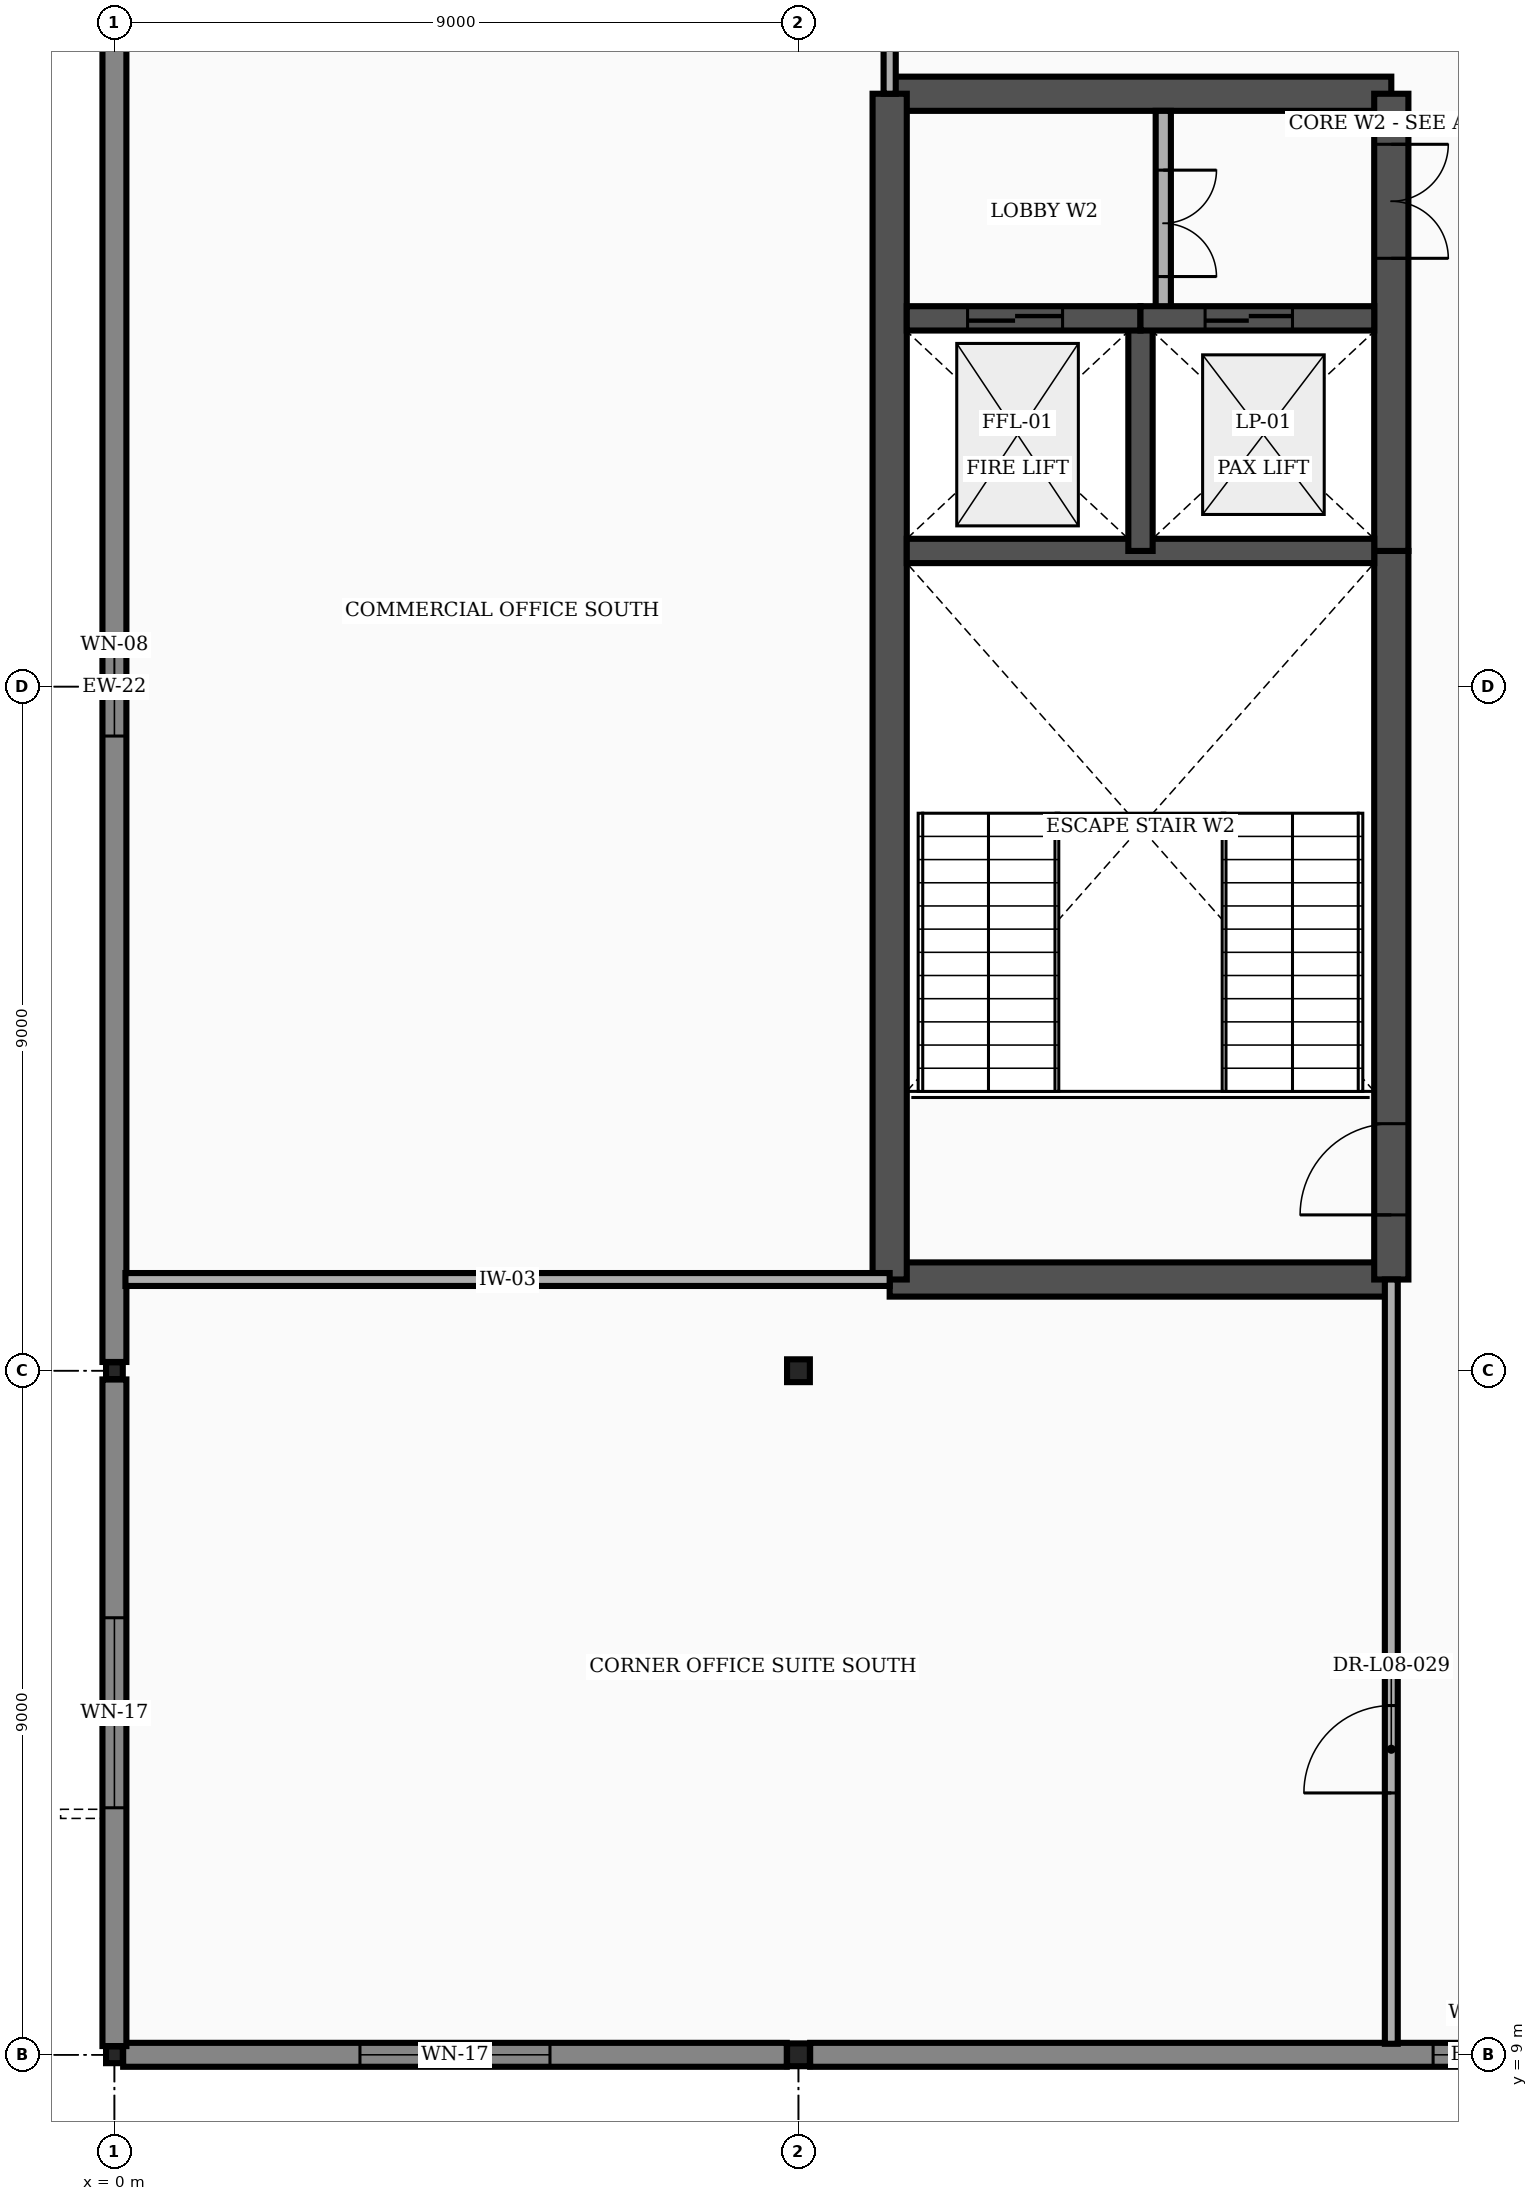
"""IFC4 building model, lengths in metres.
Left out: names, types, materials, properties, quantities, classifications, styles, units other than length and angle.
Written with IfcOpenShell. Run it as: python <this file> out.ifc"""

import sys

from ifc_helpers import new_model, si_unit, direction, frame, frame_2d, origin, origin_2d, place, context, subcontext, project, spatial, rectangle, hollow_rectangle, extrude, element, fill, save


model = new_model("IFC4")
c1 = context("Model", 3, precision=1e-05, world=origin(), true_north=direction((0.0, 1.0)))
c2 = subcontext(c1, "Body", "Model", "MODEL_VIEW")
j1 = project(units=[si_unit("LENGTHUNIT", "METRE"), si_unit("PLANEANGLEUNIT", "RADIAN")], contexts=[c1])
p1 = place(None, origin())
s1 = spatial("IfcSite", under=j1, at=p1, CompositionType="ELEMENT")
p2 = place(p1, origin())
s2 = spatial("IfcBuilding", under=s1, at=p2, CompositionType="ELEMENT")
p3 = place(p2, frame((0.0, 0.0, 37.8)))
s3 = spatial("IfcBuildingStorey", under=s2, at=p3, CompositionType="ELEMENT", Elevation=37.8)
for number, where, z_axis, x_axis in (
    (1, (0.0, 9.0, 0.0), (0.0, 0.0, 1.0), (1.0, 0.0, 0.0)),
    (2, (0.0, 18.0, 0.0), (0.0, 0.0, 1.0), (1.0, 0.0, 0.0)),
):
    element("IfcColumn", number, at=place(p3, frame(where, z_axis=z_axis, x_axis=x_axis)), inside=s3, PredefinedType="COLUMN", context=c2, shape_type="SweptSolid", body=[
        extrude(hollow_rectangle(XDim=0.22, YDim=0.22, WallThickness=0.01, at=origin_2d()), origin(), (0.0, 0.0, 1.0), 3.9),
    ])
for number, where, z_axis, x_axis in (
    (3, (9.0, 9.0, 0.0), (0.0, 0.0, 1.0), (1.0, 0.0, 0.0)),
    (4, (9.0, 18.0, 0.0), (0.0, 0.0, 1.0), (1.0, 0.0, 0.0)),
):
    element("IfcColumn", number, at=place(p3, frame(where, z_axis=z_axis, x_axis=x_axis)), inside=s3, PredefinedType="COLUMN", context=c2, shape_type="SweptSolid", body=[
        extrude(hollow_rectangle(XDim=0.3, YDim=0.3, WallThickness=0.012, at=origin_2d()), origin(), (0.0, 0.0, 1.0), 3.9),
    ])
p4 = place(p3, frame((0.115, 9.0, 0.0), z_axis=(0.0, 0.0, 1.0), x_axis=(1.0, 0.0, 0.0)))
e5 = element("IfcWall", 5, at=p4, inside=s3, PredefinedType="STANDARD", context=c2, shape_type="SweptSolid", body=[
    extrude(rectangle(XDim=8.731, YDim=0.315, at=frame_2d((4.366, 0.0))), origin(), (0.0, 0.0, 1.0), 3.565),
])
p5 = place(p4, frame((3.115, 0.0, 0.7)))
e6 = element("IfcOpeningElement", 6, at=p5, cuts=e5, PredefinedType="OPENING", context=c2, shape_type="SweptSolid", body=[
    extrude(rectangle(XDim=2.5, YDim=1.9, at=frame_2d((1.25, 0.95))), frame((0.0, 0.169, 0.0), z_axis=(0.0, -1.0, 0.0), x_axis=(1.0, 0.0, 0.0)), (0.0, 0.0, 1.0), 0.339),
])
p6 = place(p3, frame((9.154, 9.0, 0.0), z_axis=(0.0, 0.0, 1.0), x_axis=(1.0, 0.0, 0.0)))
e7 = element("IfcWall", 7, at=p6, inside=s3, PredefinedType="STANDARD", context=c2, shape_type="SweptSolid", body=[
    extrude(rectangle(XDim=17.692, YDim=0.315, at=frame_2d((8.846, 0.0))), origin(), (0.0, 0.0, 1.0), 2.803),
])
p7 = place(p6, frame((8.196, 0.0, 0.7)))
e8 = element("IfcOpeningElement", 8, at=p7, cuts=e7, PredefinedType="OPENING", context=c2, shape_type="SweptSolid", body=[
    extrude(rectangle(XDim=1.3, YDim=1.9, at=frame_2d((0.65, 0.95))), frame((0.0, 0.169, 0.0), z_axis=(0.0, -1.0, 0.0), x_axis=(1.0, 0.0, 0.0)), (0.0, 0.0, 1.0), 0.339),
])
p8 = place(p3, frame((0.0, 9.115, 0.0), z_axis=(0.0, 0.0, 1.0), x_axis=(0.0, 1.0, 0.0)))
e9 = element("IfcWall", 9, at=p8, inside=s3, PredefinedType="STANDARD", context=c2, shape_type="SweptSolid", body=[
    extrude(rectangle(XDim=8.77, YDim=0.315, at=frame_2d((4.385, 0.0))), origin(), (0.0, 0.0, 1.0), 3.565),
])
p9 = place(p8, frame((3.135, 0.0, 0.7)))
e10 = element("IfcOpeningElement", 10, at=p9, cuts=e9, PredefinedType="OPENING", context=c2, shape_type="SweptSolid", body=[
    extrude(rectangle(XDim=2.5, YDim=1.9, at=frame_2d((1.25, 0.95))), frame((0.0, 0.169, 0.0), z_axis=(0.0, -1.0, 0.0), x_axis=(1.0, 0.0, 0.0)), (0.0, 0.0, 1.0), 0.339),
])
p10 = place(p3, frame((0.0, 18.115, 0.0), z_axis=(0.0, 0.0, 1.0), x_axis=(0.0, 1.0, 0.0)))
e11 = element("IfcWall", 11, at=p10, inside=s3, PredefinedType="STANDARD", context=c2, shape_type="SweptSolid", body=[
    extrude(rectangle(XDim=17.77, YDim=0.315, at=frame_2d((8.885, 0.0))), origin(), (0.0, 0.0, 1.0), 2.953),
])
p11 = place(p10, frame((8.235, 0.0, 0.7)))
e12 = element("IfcOpeningElement", 12, at=p11, cuts=e11, PredefinedType="OPENING", context=c2, shape_type="SweptSolid", body=[
    extrude(rectangle(XDim=1.3, YDim=1.9, at=frame_2d((0.65, 0.95))), frame((0.0, 0.169, 0.0), z_axis=(0.0, -1.0, 0.0), x_axis=(1.0, 0.0, 0.0)), (0.0, 0.0, 1.0), 0.339),
])
for number, where, z_axis, x_axis in (
    (13, (10.2, 19.2, 0.0), (0.0, 0.0, 1.0), (1.0, 0.0, 0.0)),
    (14, (10.2, 34.8, 0.0), (0.0, 0.0, 1.0), (1.0, 0.0, 0.0)),
):
    element("IfcWall", number, at=place(p3, frame(where, z_axis=z_axis, x_axis=x_axis)), inside=s3, PredefinedType="SHEAR", context=c2, shape_type="SweptSolid", body=[
        extrude(rectangle(XDim=6.6, YDim=0.45, at=frame_2d((3.3, 0.0))), origin(), (0.0, 0.0, 1.0), 3.565),
    ])
p12 = place(p3, frame((10.2, 19.2, 0.0), z_axis=(0.0, 0.0, 1.0), x_axis=(0.0, 1.0, 0.0)))
e15 = element("IfcWall", 15, at=p12, inside=s3, PredefinedType="SHEAR", context=c2, shape_type="SweptSolid", body=[
    extrude(rectangle(XDim=15.6, YDim=0.45, at=frame_2d((7.8, 0.0))), origin(), (0.0, 0.0, 1.0), 3.565),
])
p13 = place(p3, frame((16.8, 19.2, 0.0), z_axis=(0.0, 0.0, 1.0), x_axis=(0.0, 1.0, 0.0)))
e16 = element("IfcWall", 16, at=p13, inside=s3, PredefinedType="SHEAR", context=c2, shape_type="SweptSolid", body=[
    extrude(rectangle(XDim=9.585, YDim=0.45, at=frame_2d((4.792, 0.0))), origin(), (0.0, 0.0, 1.0), 3.565),
])
p14 = place(p13, frame((0.85, 0.0, 0.0)))
e17 = element("IfcOpeningElement", 17, at=p14, cuts=e16, PredefinedType="OPENING", context=c2, shape_type="SweptSolid", body=[
    extrude(rectangle(XDim=1.2, YDim=2.2, at=frame_2d((0.6, 1.1))), frame((0.0, 0.237, 0.0), z_axis=(0.0, -1.0, 0.0), x_axis=(1.0, 0.0, 0.0)), (0.0, 0.0, 1.0), 0.474),
])
p15 = place(p3, frame((16.8, 28.785, 0.0), z_axis=(0.0, 0.0, 1.0), x_axis=(0.0, 1.0, 0.0)))
e18 = element("IfcWall", 18, at=p15, inside=s3, PredefinedType="SHEAR", context=c2, shape_type="SweptSolid", body=[
    extrude(rectangle(XDim=6.015, YDim=0.45, at=frame_2d((3.008, 0.0))), origin(), (0.0, 0.0, 1.0), 3.565),
])
p16 = place(p15, frame((3.85, 0.0, 0.0)))
e19 = element("IfcOpeningElement", 19, at=p16, cuts=e18, PredefinedType="OPENING", context=c2, shape_type="SweptSolid", body=[
    extrude(rectangle(XDim=1.5, YDim=2.2, at=frame_2d((0.75, 1.1))), frame((0.0, 0.237, 0.0), z_axis=(0.0, -1.0, 0.0), x_axis=(1.0, 0.0, 0.0)), (0.0, 0.0, 1.0), 0.474),
])
p17 = place(p3, frame((10.425, 28.785, 0.0), z_axis=(0.0, 0.0, 1.0), x_axis=(1.0, 0.0, 0.0)))
e20 = element("IfcWall", 20, at=p17, inside=s3, PredefinedType="SHEAR", context=c2, shape_type="SweptSolid", body=[
    extrude(rectangle(XDim=6.15, YDim=0.32, at=frame_2d((3.075, 0.0))), origin(), (0.0, 0.0, 1.0), 3.565),
])
p18 = place(p3, frame((13.5, 28.785, 0.0), z_axis=(0.0, 0.0, 1.0), x_axis=(0.0, 1.0, 0.0)))
e21 = element("IfcWall", 21, at=p18, inside=s3, PredefinedType="SHEAR", context=c2, shape_type="SweptSolid", body=[
    extrude(rectangle(XDim=3.06, YDim=0.32, at=frame_2d((1.53, 0.0))), origin(), (0.0, 0.0, 1.0), 3.565),
])
p19 = place(p3, frame((13.8, 31.845, 0.0), z_axis=(0.0, 0.0, 1.0), x_axis=(0.0, 1.0, 0.0)))
e22 = element("IfcWall", 22, at=p19, inside=s3, PredefinedType="PARTITIONING", context=c2, shape_type="SweptSolid", body=[
    extrude(rectangle(XDim=2.73, YDim=0.2, at=frame_2d((1.365, 0.0))), origin(), (0.0, 0.0, 1.0), 3.565),
])
p20 = place(p19, frame((0.55, 0.0, 0.0)))
e23 = element("IfcOpeningElement", 23, at=p20, cuts=e22, PredefinedType="OPENING", context=c2, shape_type="SweptSolid", body=[
    extrude(rectangle(XDim=1.4, YDim=2.25, at=frame_2d((0.7, 1.125))), frame((0.0, 0.112, 0.0), z_axis=(0.0, -1.0, 0.0), x_axis=(1.0, 0.0, 0.0)), (0.0, 0.0, 1.0), 0.224),
])
p21 = place(p3, frame((10.425, 31.845, 0.0), z_axis=(0.0, 0.0, 1.0), x_axis=(1.0, 0.0, 0.0)))
e24 = element("IfcWall", 24, at=p21, inside=s3, PredefinedType="SHEAR", context=c2, shape_type="SweptSolid", body=[
    extrude(rectangle(XDim=3.075, YDim=0.32, at=frame_2d((1.538, 0.0))), origin(), (0.0, 0.0, 1.0), 3.565),
])
p22 = place(p21, frame((0.8, 0.0, 0.0)))
e25 = element("IfcOpeningElement", 25, at=p22, cuts=e24, PredefinedType="OPENING", context=c2, shape_type="SweptSolid", body=[
    extrude(rectangle(XDim=1.25, YDim=2.25, at=frame_2d((0.625, 1.125))), frame((0.0, 0.172, 0.0), z_axis=(0.0, -1.0, 0.0), x_axis=(1.0, 0.0, 0.0)), (0.0, 0.0, 1.0), 0.344),
])
p23 = place(p3, frame((13.5, 31.845, 0.0), z_axis=(0.0, 0.0, 1.0), x_axis=(1.0, 0.0, 0.0)))
e26 = element("IfcWall", 26, at=p23, inside=s3, PredefinedType="SHEAR", context=c2, shape_type="SweptSolid", body=[
    extrude(rectangle(XDim=3.075, YDim=0.32, at=frame_2d((1.538, 0.0))), origin(), (0.0, 0.0, 1.0), 3.565),
])
p24 = place(p23, frame((0.85, 0.0, 0.0)))
e27 = element("IfcOpeningElement", 27, at=p24, cuts=e26, PredefinedType="OPENING", context=c2, shape_type="SweptSolid", body=[
    extrude(rectangle(XDim=1.15, YDim=2.2, at=frame_2d((0.575, 1.1))), frame((0.0, 0.172, 0.0), z_axis=(0.0, -1.0, 0.0), x_axis=(1.0, 0.0, 0.0)), (0.0, 0.0, 1.0), 0.344),
])
p25 = place(p3, frame((10.2, 34.8, 0.0), z_axis=(0.0, 0.0, 1.0), x_axis=(0.0, 1.0, 0.0)))
e28 = element("IfcWall", 28, at=p25, inside=s3, PredefinedType="PARTITIONING", context=c2, shape_type="SweptSolid", body=[
    extrude(rectangle(XDim=2.0, YDim=0.16, at=frame_2d((1.0, 0.0))), origin(), (0.0, 0.0, 1.0), 3.565),
])
p26 = place(p3, frame((0.145, 19.2, 0.0), z_axis=(0.0, 0.0, 1.0), x_axis=(1.0, 0.0, 0.0)))
e29 = element("IfcWall", 29, at=p26, inside=s3, PredefinedType="PARTITIONING", context=c2, shape_type="SweptSolid", body=[
    extrude(rectangle(XDim=10.055, YDim=0.17, at=frame_2d((5.027, 0.0))), origin(), (0.0, 0.0, 1.0), 3.565),
])
p27 = place(p3, frame((16.8, 9.145, 0.0), z_axis=(0.0, 0.0, 1.0), x_axis=(0.0, 1.0, 0.0)))
e30 = element("IfcWall", 30, at=p27, inside=s3, PredefinedType="PARTITIONING", context=c2, shape_type="SweptSolid", body=[
    extrude(rectangle(XDim=10.055, YDim=0.17, at=frame_2d((5.027, 0.0))), origin(), (0.0, 0.0, 1.0), 3.565),
])
p28 = place(p27, frame((3.3, 0.0, 0.0)))
e31 = element("IfcOpeningElement", 31, at=p28, cuts=e30, PredefinedType="OPENING", context=c2, shape_type="SweptSolid", body=[
    extrude(rectangle(XDim=1.15, YDim=2.15, at=frame_2d((0.575, 1.075))), frame((0.0, 0.097, 0.0), z_axis=(0.0, -1.0, 0.0), x_axis=(1.0, 0.0, 0.0)), (0.0, 0.0, 1.0), 0.194),
])
p29 = place(p5, origin())
e32 = element("IfcWindow", 32, at=p29, inside=s3, PartitioningType="SINGLE_PANEL", PredefinedType="WINDOW", context=c2, shape_type="SweptSolid", body=[
    extrude(rectangle(XDim=2.5, YDim=1.9, at=frame_2d((1.25, 0.95))), frame((0.0, 0.03, 0.0), z_axis=(0.0, -1.0, 0.0), x_axis=(1.0, 0.0, 0.0)), (0.0, 0.0, 1.0), 0.06),
])
fill(e6, e32)
p30 = place(p7, origin())
e33 = element("IfcWindow", 33, at=p30, inside=s3, PartitioningType="SINGLE_PANEL", PredefinedType="WINDOW", context=c2, shape_type="SweptSolid", body=[
    extrude(rectangle(XDim=1.3, YDim=1.9, at=frame_2d((0.65, 0.95))), frame((0.0, 0.03, 0.0), z_axis=(0.0, -1.0, 0.0), x_axis=(1.0, 0.0, 0.0)), (0.0, 0.0, 1.0), 0.06),
])
fill(e8, e33)
p31 = place(p9, origin())
e34 = element("IfcWindow", 34, at=p31, inside=s3, PartitioningType="SINGLE_PANEL", PredefinedType="WINDOW", context=c2, shape_type="SweptSolid", body=[
    extrude(rectangle(XDim=2.5, YDim=1.9, at=frame_2d((1.25, 0.95))), frame((0.0, 0.03, 0.0), z_axis=(0.0, -1.0, 0.0), x_axis=(1.0, 0.0, 0.0)), (0.0, 0.0, 1.0), 0.06),
])
fill(e10, e34)
p32 = place(p11, origin())
e35 = element("IfcWindow", 35, at=p32, inside=s3, PartitioningType="SINGLE_PANEL", PredefinedType="WINDOW", context=c2, shape_type="SweptSolid", body=[
    extrude(rectangle(XDim=1.3, YDim=1.9, at=frame_2d((0.65, 0.95))), frame((0.0, 0.03, 0.0), z_axis=(0.0, -1.0, 0.0), x_axis=(1.0, 0.0, 0.0)), (0.0, 0.0, 1.0), 0.06),
])
fill(e12, e35)
p33 = place(p14, origin())
e36 = element("IfcDoor", 36, at=p33, inside=s3, OperationType="SINGLE_SWING_LEFT", PredefinedType="DOOR", context=c2, shape_type="SweptSolid", body=[
    extrude(rectangle(XDim=1.2, YDim=2.2, at=frame_2d((0.6, 1.1))), frame((0.0, 0.025, 0.0), z_axis=(0.0, -1.0, 0.0), x_axis=(1.0, 0.0, 0.0)), (0.0, 0.0, 1.0), 0.05),
])
fill(e17, e36)
p34 = place(p16, frame((1.5, 0.0, 0.0), z_axis=(0.0, 0.0, 1.0), x_axis=(-1.0, 0.0, 0.0)))
e37 = element("IfcDoor", 37, at=p34, inside=s3, OperationType="DOUBLE_DOOR_SINGLE_SWING", PredefinedType="DOOR", context=c2, shape_type="SweptSolid", body=[
    extrude(rectangle(XDim=1.5, YDim=2.2, at=frame_2d((0.75, 1.1))), frame((0.0, 0.025, 0.0), z_axis=(0.0, -1.0, 0.0), x_axis=(1.0, 0.0, 0.0)), (0.0, 0.0, 1.0), 0.05),
])
fill(e19, e37)
p35 = place(p20, frame((1.4, 0.0, 0.0), z_axis=(0.0, 0.0, 1.0), x_axis=(-1.0, 0.0, 0.0)))
e38 = element("IfcDoor", 38, at=p35, inside=s3, OperationType="DOUBLE_DOOR_SINGLE_SWING", PredefinedType="DOOR", context=c2, shape_type="SweptSolid", body=[
    extrude(rectangle(XDim=1.4, YDim=2.25, at=frame_2d((0.7, 1.125))), frame((0.0, 0.025, 0.0), z_axis=(0.0, -1.0, 0.0), x_axis=(1.0, 0.0, 0.0)), (0.0, 0.0, 1.0), 0.05),
])
fill(e23, e38)
p36 = place(p22, origin())
e39 = element("IfcDoor", 39, at=p36, inside=s3, OperationType="DOUBLE_DOOR_SLIDING", PredefinedType="DOOR", context=c2, shape_type="SweptSolid", body=[
    extrude(rectangle(XDim=1.25, YDim=2.25, at=frame_2d((0.625, 1.125))), frame((0.0, 0.025, 0.0), z_axis=(0.0, -1.0, 0.0), x_axis=(1.0, 0.0, 0.0)), (0.0, 0.0, 1.0), 0.05),
])
fill(e25, e39)
p37 = place(p24, origin())
e40 = element("IfcDoor", 40, at=p37, inside=s3, OperationType="DOUBLE_DOOR_SLIDING", PredefinedType="DOOR", context=c2, shape_type="SweptSolid", body=[
    extrude(rectangle(XDim=1.15, YDim=2.2, at=frame_2d((0.575, 1.1))), frame((0.0, 0.025, 0.0), z_axis=(0.0, -1.0, 0.0), x_axis=(1.0, 0.0, 0.0)), (0.0, 0.0, 1.0), 0.05),
])
fill(e27, e40)
p38 = place(p28, origin())
e41 = element("IfcDoor", 41, at=p38, inside=s3, OperationType="SINGLE_SWING_LEFT", PredefinedType="DOOR", context=c2, shape_type="SweptSolid", body=[
    extrude(rectangle(XDim=1.15, YDim=2.15, at=frame_2d((0.575, 1.075))), frame((0.0, 0.025, 0.0), z_axis=(0.0, -1.0, 0.0), x_axis=(1.0, 0.0, 0.0)), (0.0, 0.0, 1.0), 0.05),
])
fill(e31, e41)
save(model, sys.argv[1])
